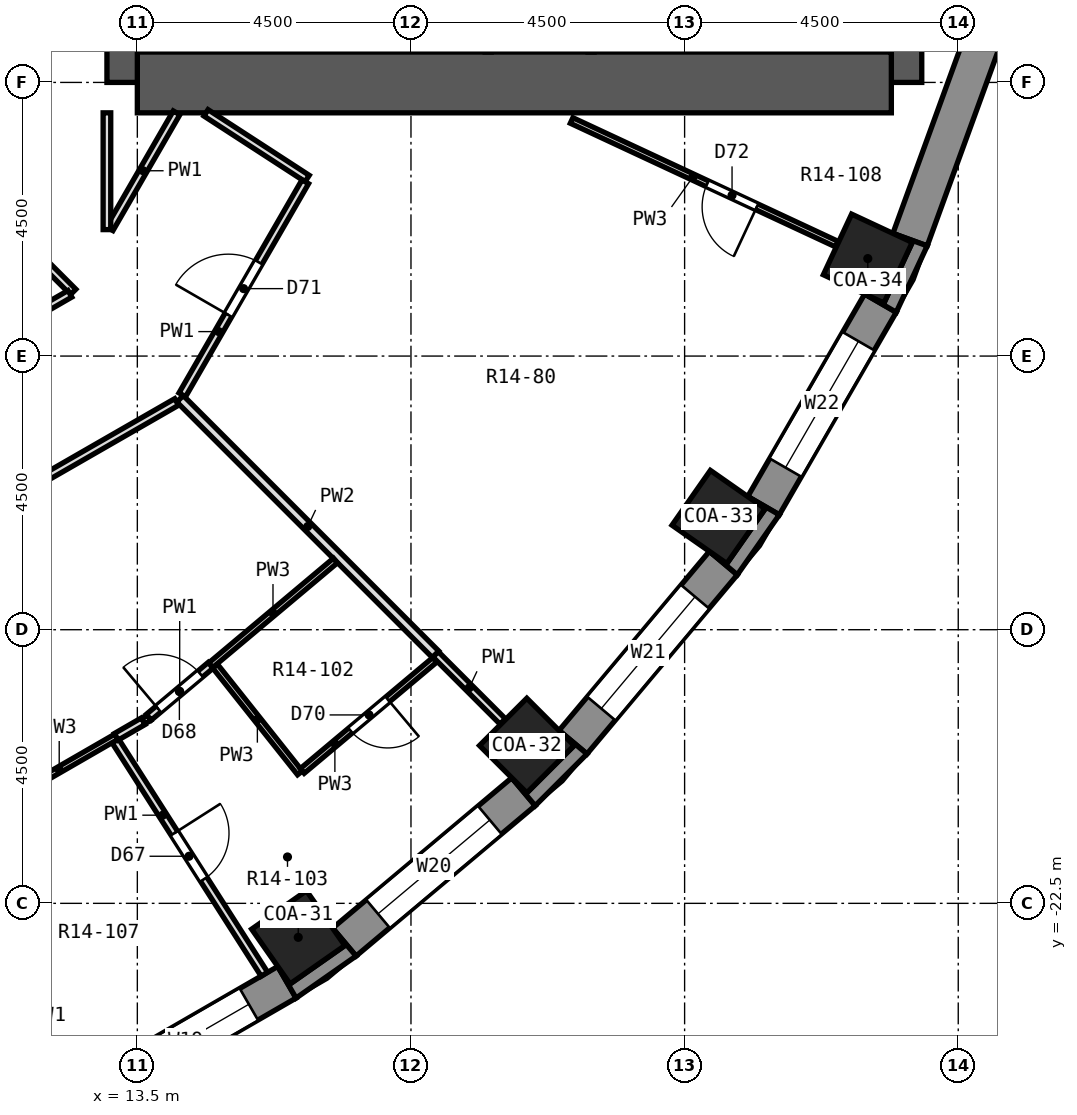
"""IFC4 building model, lengths in metres.
Left out: names, types, materials, properties, quantities, classifications, styles, units other than length and angle.
Written with IfcOpenShell. Run it as: python <this file> out.ifc"""

import sys

from ifc_helpers import new_model, si_unit, direction, frame, frame_2d, origin, origin_2d, place, context, subcontext, project, spatial, polyline, rectangle, outline, extrude, element, fill, save


model = new_model("IFC4")
c1 = context("Model", 3, precision=1e-05, world=origin(), true_north=direction((0.0, 1.0)))
c2 = subcontext(c1, "Body", "Model", "MODEL_VIEW")
j1 = project(units=[si_unit("LENGTHUNIT", "METRE"), si_unit("PLANEANGLEUNIT", "RADIAN")], contexts=[c1])
p1 = place(None, origin())
s1 = spatial("IfcSite", under=j1, at=p1, CompositionType="ELEMENT")
p2 = place(p1, origin())
s2 = spatial("IfcBuilding", under=s1, at=p2, CompositionType="ELEMENT")
p3 = place(p2, frame((0.0, 0.0, 75.8)))
s3 = spatial("IfcBuildingStorey", under=s2, at=p3, CompositionType="ELEMENT", Elevation=75.8)
for number, where, z_axis, x_axis in (
    (1, (16.146, -23.059, 0.0), (0.0, 0.0, 1.0), (0.574, -0.819, 0.0)),
    (2, (19.905, -19.905, 0.0), (0.0, 0.0, 1.0), (0.707, -0.707, 0.0)),
    (3, (23.059, -16.146, 0.0), (0.0, 0.0, 1.0), (0.819, -0.574, 0.0)),
    (4, (25.512, -11.897, 0.0), (0.0, 0.0, 1.0), (0.906, -0.423, 0.0)),
):
    element("IfcColumn", number, at=place(p3, frame(where, z_axis=z_axis, x_axis=x_axis)), inside=s3, PredefinedType="COLUMN", context=c2, shape_type="SweptSolid", body=[
        extrude(rectangle(XDim=1.1, YDim=1.1, at=origin_2d()), origin(), (0.0, 0.0, 1.0), 3.3),
    ])
p4 = place(p3, frame((13.5, -9.0, 0.0), z_axis=(0.0, 0.0, 1.0), x_axis=(0.0, 1.0, 0.0)))
e5 = element("IfcWall", 5, at=p4, inside=s3, PredefinedType="SHEAR", context=c2, shape_type="SweptSolid", body=[
    extrude(rectangle(XDim=18.0, YDim=1.0, at=frame_2d((9.0, 0.0))), origin(), (0.0, 0.0, 1.0), 3.3),
])
p5 = place(p4, frame((15.4, 0.0, 0.0)))
e6 = element("IfcOpeningElement", 6, at=p5, cuts=e5, PredefinedType="OPENING", context=c2, shape_type="SweptSolid", body=[
    extrude(rectangle(XDim=1.2, YDim=2.1, at=frame_2d((0.6, 1.05))), frame((0.0, 0.512, 0.0), z_axis=(0.0, -1.0, 0.0), x_axis=(1.0, 0.0, 0.0)), (0.0, 0.0, 1.0), 1.024),
])
p6 = place(p4, frame((1.4, 0.0, 0.0)))
e7 = element("IfcOpeningElement", 7, at=p6, cuts=e5, PredefinedType="OPENING", context=c2, shape_type="SweptSolid", body=[
    extrude(rectangle(XDim=1.2, YDim=2.1, at=frame_2d((0.6, 1.05))), frame((0.0, 0.512, 0.0), z_axis=(0.0, -1.0, 0.0), x_axis=(1.0, 0.0, 0.0)), (0.0, 0.0, 1.0), 1.024),
])
p7 = place(p4, frame((7.5, 0.0, 0.0)))
e8 = element("IfcOpeningElement", 8, at=p7, cuts=e5, PredefinedType="OPENING", context=c2, shape_type="SweptSolid", body=[
    extrude(rectangle(XDim=3.0, YDim=2.4, at=frame_2d((1.5, 1.2))), frame((0.0, 0.512, 0.0), z_axis=(0.0, -1.0, 0.0), x_axis=(1.0, 0.0, 0.0)), (0.0, 0.0, 1.0), 1.024),
])
p8 = place(p3, frame((25.9, -9.0, 0.0), z_axis=(0.0, 0.0, 1.0), x_axis=(0.0, 1.0, 0.0)))
e9 = element("IfcWall", 9, at=p8, inside=s3, PredefinedType="SHEAR", context=c2, shape_type="SweptSolid", body=[
    extrude(rectangle(XDim=18.0, YDim=1.0, at=frame_2d((9.0, 0.0))), origin(), (0.0, 0.0, 1.0), 3.3),
])
p9 = place(p3, frame((13.5, -9.0, 0.0), z_axis=(0.0, 0.0, 1.0), x_axis=(1.0, 0.0, 0.0)))
e10 = element("IfcWall", 10, at=p9, inside=s3, PredefinedType="SHEAR", context=c2, shape_type="SweptSolid", body=[
    extrude(rectangle(XDim=12.4, YDim=1.0, at=frame_2d((6.2, 0.0))), origin(), (0.0, 0.0, 1.0), 3.3),
])
p10 = place(p3, frame((12.63, -25.721, 0.0), z_axis=(0.0, 0.0, 1.0), x_axis=(0.86603124159, 0.499989888488, 0.0)))
e11 = element("IfcWall", 11, at=p10, inside=s3, PredefinedType="SOLIDWALL", context=c2, shape_type="SweptSolid", body=[
    extrude(rectangle(XDim=3.846, YDim=0.6, at=frame_2d((1.923, 0.0))), origin(), (0.0, 0.0, 1.0), 2.75),
])
p11 = place(p10, frame((0.723, 0.0, 0.9)))
e12 = element("IfcOpeningElement", 12, at=p11, cuts=e11, PredefinedType="OPENING", context=c2, shape_type="SweptSolid", body=[
    extrude(rectangle(XDim=2.4, YDim=1.8, at=frame_2d((1.2, 0.9))), frame((0.0, 0.312, 0.0), z_axis=(0.0, -1.0, 0.0), x_axis=(1.0, 0.0, 0.0)), (0.0, 0.0, 1.0), 0.624),
])
p12 = place(p3, frame((16.904, -23.137, 0.0), z_axis=(0.0, 0.0, 1.0), x_axis=(0.766026164483, 0.642809392687, 0.0)))
e13 = element("IfcWall", 13, at=p12, inside=s3, PredefinedType="SOLIDWALL", context=c2, shape_type="SweptSolid", body=[
    extrude(rectangle(XDim=3.846, YDim=0.6, at=frame_2d((1.923, 0.0))), origin(), (0.0, 0.0, 1.0), 2.75),
])
p13 = place(p12, frame((0.723, 0.0, 0.9)))
e14 = element("IfcOpeningElement", 14, at=p13, cuts=e13, PredefinedType="OPENING", context=c2, shape_type="SweptSolid", body=[
    extrude(rectangle(XDim=2.4, YDim=1.8, at=frame_2d((1.2, 0.9))), frame((0.0, 0.312, 0.0), z_axis=(0.0, -1.0, 0.0), x_axis=(1.0, 0.0, 0.0)), (0.0, 0.0, 1.0), 0.624),
])
p14 = place(p3, frame((20.665, -19.85, 0.0), z_axis=(0.0, 0.0, 1.0), x_axis=(0.642809392687, 0.766026164483, 0.0)))
e15 = element("IfcWall", 15, at=p14, inside=s3, PredefinedType="SOLIDWALL", context=c2, shape_type="SweptSolid", body=[
    extrude(rectangle(XDim=3.846, YDim=0.6, at=frame_2d((1.923, 0.0))), origin(), (0.0, 0.0, 1.0), 2.75),
])
p15 = place(p14, frame((0.723, 0.0, 0.9)))
e16 = element("IfcOpeningElement", 16, at=p15, cuts=e15, PredefinedType="OPENING", context=c2, shape_type="SweptSolid", body=[
    extrude(rectangle(XDim=2.4, YDim=1.8, at=frame_2d((1.2, 0.9))), frame((0.0, 0.312, 0.0), z_axis=(0.0, -1.0, 0.0), x_axis=(1.0, 0.0, 0.0)), (0.0, 0.0, 1.0), 0.624),
])
p16 = place(p3, frame((23.798, -15.96, 0.0), z_axis=(0.0, 0.0, 1.0), x_axis=(0.499989888488, 0.86603124159, 0.0)))
e17 = element("IfcWall", 17, at=p16, inside=s3, PredefinedType="SOLIDWALL", context=c2, shape_type="SweptSolid", body=[
    extrude(rectangle(XDim=3.846, YDim=0.6, at=frame_2d((1.923, 0.0))), origin(), (0.0, 0.0, 1.0), 2.75),
])
p17 = place(p16, frame((0.723, 0.0, 0.9)))
e18 = element("IfcOpeningElement", 18, at=p17, cuts=e17, PredefinedType="OPENING", context=c2, shape_type="SweptSolid", body=[
    extrude(rectangle(XDim=2.4, YDim=1.8, at=frame_2d((1.2, 0.9))), frame((0.0, 0.312, 0.0), z_axis=(0.0, -1.0, 0.0), x_axis=(1.0, 0.0, 0.0)), (0.0, 0.0, 1.0), 0.624),
])
p18 = place(p3, frame((26.208, -11.585, 0.0), z_axis=(0.0, 0.0, 1.0), x_axis=(0.342028474173, 0.939689588564, 0.0)))
e19 = element("IfcWall", 19, at=p18, inside=s3, PredefinedType="SOLIDWALL", context=c2, shape_type="SweptSolid", body=[
    extrude(rectangle(XDim=3.846, YDim=0.6, at=frame_2d((1.923, 0.0))), origin(), (0.0, 0.0, 1.0), 2.75),
])
p19 = place(p3, origin())
e20 = element("IfcWall", 20, at=p19, inside=s3, PredefinedType="SOLIDWALL", context=c2, shape_type="SweptSolid", body=[
    extrude(outline(polyline([(16.11, -24.058), (17.097, -23.367), (16.711, -22.907), (16.912, -23.194), (16.011, -23.825), (15.81, -23.538), (16.11, -24.058)])), origin(), (0.0, 0.0, 1.0), 2.75),
])
p20 = place(p3, origin())
e21 = element("IfcWall", 21, at=p20, inside=s3, PredefinedType="SOLIDWALL", context=c2, shape_type="SweptSolid", body=[
    extrude(outline(polyline([(20.895, -20.043), (20.435, -19.657), (20.683, -19.905), (19.905, -20.683), (19.657, -20.435), (20.043, -20.895), (20.895, -20.043)])), origin(), (0.0, 0.0, 1.0), 2.75),
])
p21 = place(p3, origin())
e22 = element("IfcWall", 22, at=p21, inside=s3, PredefinedType="SOLIDWALL", context=c2, shape_type="SweptSolid", body=[
    extrude(outline(polyline([(23.367, -17.097), (24.058, -16.11), (23.538, -15.81), (23.825, -16.011), (23.194, -16.912), (22.907, -16.711), (23.367, -17.097)])), origin(), (0.0, 0.0, 1.0), 2.75),
])
p22 = place(p3, origin())
e23 = element("IfcWall", 23, at=p22, inside=s3, PredefinedType="SOLIDWALL", context=c2, shape_type="SweptSolid", body=[
    extrude(outline(polyline([(26.49, -11.688), (25.926, -11.483), (26.243, -11.631), (25.779, -12.628), (25.461, -12.479), (25.981, -12.78), (26.49, -11.688)])), origin(), (0.0, 0.0, 1.0), 2.75),
])
p23 = place(p3, frame((13.138, -19.828, 0.0), z_axis=(0.0, 0.0, 1.0), x_axis=(0.538359660084, -0.842715181063, 0.0)))
e24 = element("IfcWall", 24, at=p23, inside=s3, PredefinedType="PARTITIONING", context=c2, shape_type="SweptSolid", body=[
    extrude(rectangle(XDim=4.553, YDim=0.125, at=frame_2d((2.276, 0.0))), origin(), (0.0, 0.0, 1.0), 2.75),
])
p24 = place(p23, frame((1.802, 0.0, 0.0)))
e25 = element("IfcOpeningElement", 25, at=p24, cuts=e24, PredefinedType="OPENING", context=c2, shape_type="SweptSolid", body=[
    extrude(rectangle(XDim=0.9, YDim=2.1, at=frame_2d((0.45, 1.05))), frame((0.0, 0.074, 0.0), z_axis=(0.0, -1.0, 0.0), x_axis=(1.0, 0.0, 0.0)), (0.0, 0.0, 1.0), 0.149),
])
p25 = place(p3, frame((14.774, -18.593, 0.0), z_axis=(0.0, 0.0, 1.0), x_axis=(0.622124779816, -0.782918104491, 0.0)))
e26 = element("IfcWall", 26, at=p25, inside=s3, PredefinedType="PARTITIONING", context=c2, shape_type="SweptSolid", body=[
    extrude(rectangle(XDim=2.25, YDim=0.1, at=frame_2d((1.125, 0.0))), origin(), (0.0, 0.0, 1.0), 2.75),
])
p26 = place(p3, frame((6.783, -6.783, 0.0), z_axis=(0.0, 0.0, 1.0), x_axis=(0.707106781187, -0.707106781187, 0.0)))
e27 = element("IfcWall", 27, at=p26, inside=s3, PredefinedType="PARTITIONING", context=c2, shape_type="SweptSolid", body=[
    extrude(rectangle(XDim=8.008, YDim=0.125, at=frame_2d((4.004, 0.0))), origin(), (0.0, 0.0, 1.0), 2.75),
])
p27 = place(p3, frame((18.404, -18.404, 0.0), z_axis=(0.0, 0.0, 1.0), x_axis=(0.707106781187, -0.707106781187, 0.0)))
e28 = element("IfcWall", 28, at=p27, inside=s3, PredefinedType="PARTITIONING", context=c2, shape_type="SweptSolid", body=[
    extrude(rectangle(XDim=1.563, YDim=0.125, at=frame_2d((0.781, 0.0))), origin(), (0.0, 0.0, 1.0), 2.75),
])
p28 = place(p3, frame((14.202, -14.202, 0.0), z_axis=(0.0, 0.0, 1.0), x_axis=(0.707106781187, -0.707106781187, 0.0)))
e29 = element("IfcWall", 29, at=p28, inside=s3, PredefinedType="PARTITIONING", context=c2, shape_type="SweptSolid", body=[
    extrude(rectangle(XDim=5.942, YDim=0.15, at=frame_2d((2.971, 0.0))), origin(), (0.0, 0.0, 1.0), 2.75),
])
p29 = place(p3, frame((14.629, -9.5, 0.0), z_axis=(0.0, 0.0, 1.0), x_axis=(0.838803325008, -0.544434552499, 0.0)))
e30 = element("IfcWall", 30, at=p29, inside=s3, PredefinedType="PARTITIONING", context=c2, shape_type="SweptSolid", body=[
    extrude(rectangle(XDim=1.984, YDim=0.125, at=frame_2d((0.992, 0.0))), origin(), (0.0, 0.0, 1.0), 2.75),
])
p30 = place(p3, frame((20.642, -9.626, 0.0), z_axis=(0.0, 0.0, 1.0), x_axis=(0.90635409516, -0.422518939442, 0.0)))
e31 = element("IfcWall", 31, at=p30, inside=s3, PredefinedType="PARTITIONING", context=c2, shape_type="SweptSolid", body=[
    extrude(rectangle(XDim=4.814, YDim=0.1, at=frame_2d((2.407, 0.0))), origin(), (0.0, 0.0, 1.0), 2.75),
])
p31 = place(p30, frame((2.461, 0.0, 0.0)))
e32 = element("IfcOpeningElement", 32, at=p31, cuts=e31, PredefinedType="OPENING", context=c2, shape_type="SweptSolid", body=[
    extrude(rectangle(XDim=0.9, YDim=2.1, at=frame_2d((0.45, 1.05))), frame((0.0, 0.062, 0.0), z_axis=(0.0, -1.0, 0.0), x_axis=(1.0, 0.0, 0.0)), (0.0, 0.0, 1.0), 0.124),
])
p32 = place(p3, frame((5.251, -19.367, 0.0), z_axis=(0.0, 0.0, 1.0), x_axis=(0.86701914354, 0.498274828519, 0.0)))
e33 = element("IfcWall", 33, at=p32, inside=s3, PredefinedType="PARTITIONING", context=c2, shape_type="SweptSolid", body=[
    extrude(rectangle(XDim=10.259, YDim=0.125, at=frame_2d((5.129, 0.0))), origin(), (0.0, 0.0, 1.0), 2.75),
])
p33 = place(p3, frame((10.093, -21.527, 0.0), z_axis=(0.0, 0.0, 1.0), x_axis=(0.866092412582, 0.499883919394, 0.0)))
e34 = element("IfcWall", 34, at=p33, inside=s3, PredefinedType="PARTITIONING", context=c2, shape_type="SweptSolid", body=[
    extrude(rectangle(XDim=3.534, YDim=0.1, at=frame_2d((1.767, 0.0))), origin(), (0.0, 0.0, 1.0), 2.75),
])
p34 = place(p33, frame((1.267, 0.0, 0.0)))
e35 = element("IfcOpeningElement", 35, at=p34, cuts=e34, PredefinedType="OPENING", context=c2, shape_type="SweptSolid", body=[
    extrude(rectangle(XDim=0.9, YDim=2.1, at=frame_2d((0.45, 1.05))), frame((0.0, 0.062, 0.0), z_axis=(0.0, -1.0, 0.0), x_axis=(1.0, 0.0, 0.0)), (0.0, 0.0, 1.0), 0.124),
])
p35 = place(p3, frame((13.597, -19.505, 0.0), z_axis=(0.0, 0.0, 1.0), x_axis=(0.86665063443, 0.498915501706, 0.0)))
e36 = element("IfcWall", 36, at=p35, inside=s3, PredefinedType="PARTITIONING", context=c2, shape_type="SweptSolid", body=[
    extrude(rectangle(XDim=0.114, YDim=0.1, at=frame_2d((0.057, 0.0))), origin(), (0.0, 0.0, 1.0), 2.75),
])
p36 = place(p3, frame((13.154, -19.761, 0.0), z_axis=(0.0, 0.0, 1.0), x_axis=(0.865644253932, 0.500659590574, 0.0)))
e37 = element("IfcWall", 37, at=p36, inside=s3, PredefinedType="PARTITIONING", context=c2, shape_type="SweptSolid", body=[
    extrude(rectangle(XDim=0.511, YDim=0.125, at=frame_2d((0.255, 0.0))), origin(), (0.0, 0.0, 1.0), 2.75),
])
p37 = place(p3, frame((4.609, -16.969, 0.0), z_axis=(0.0, 0.0, 1.0), x_axis=(0.866042609802, 0.499970197119, 0.0)))
e38 = element("IfcWall", 38, at=p37, inside=s3, PredefinedType="PARTITIONING", context=c2, shape_type="SweptSolid", body=[
    extrude(rectangle(XDim=8.985, YDim=0.125, at=frame_2d((4.493, 0.0))), origin(), (0.0, 0.0, 1.0), 2.75),
])
p38 = place(p37, frame((3.993, 0.0, 0.0)))
e39 = element("IfcOpeningElement", 39, at=p38, cuts=e38, PredefinedType="OPENING", context=c2, shape_type="SweptSolid", body=[
    extrude(rectangle(XDim=1.0, YDim=2.1, at=frame_2d((0.5, 1.05))), frame((0.0, 0.074, 0.0), z_axis=(0.0, -1.0, 0.0), x_axis=(1.0, 0.0, 0.0)), (0.0, 0.0, 1.0), 0.149),
])
p39 = place(p3, frame((16.212, -20.323, 0.0), z_axis=(0.0, 0.0, 1.0), x_axis=(0.766232462385, 0.642563470474, 0.0)))
e40 = element("IfcWall", 40, at=p39, inside=s3, PredefinedType="PARTITIONING", context=c2, shape_type="SweptSolid", body=[
    extrude(rectangle(XDim=2.843, YDim=0.1, at=frame_2d((1.421, 0.0))), origin(), (0.0, 0.0, 1.0), 2.75),
])
p40 = place(p39, frame((1.034, 0.0, 0.0)))
e41 = element("IfcOpeningElement", 41, at=p40, cuts=e40, PredefinedType="OPENING", context=c2, shape_type="SweptSolid", body=[
    extrude(rectangle(XDim=0.8, YDim=2.1, at=frame_2d((0.4, 1.05))), frame((0.0, 0.062, 0.0), z_axis=(0.0, -1.0, 0.0), x_axis=(1.0, 0.0, 0.0)), (0.0, 0.0, 1.0), 0.124),
])
p41 = place(p3, frame((14.704, -18.586, 0.0), z_axis=(0.0, 0.0, 1.0), x_axis=(0.765999084346, 0.642841662294, 0.0)))
e42 = element("IfcWall", 42, at=p41, inside=s3, PredefinedType="PARTITIONING", context=c2, shape_type="SweptSolid", body=[
    extrude(rectangle(XDim=2.68, YDim=0.1, at=frame_2d((1.34, 0.0))), origin(), (0.0, 0.0, 1.0), 2.75),
])
p42 = place(p3, frame((13.688, -19.44, 0.0), z_axis=(0.0, 0.0, 1.0), x_axis=(0.765864266058, 0.643002275249, 0.0)))
e43 = element("IfcWall", 43, at=p42, inside=s3, PredefinedType="PARTITIONING", context=c2, shape_type="SweptSolid", body=[
    extrude(rectangle(XDim=1.327, YDim=0.125, at=frame_2d((0.664, 0.0))), origin(), (0.0, 0.0, 1.0), 2.75),
])
p43 = place(p42, frame((0.208, 0.0, 0.0)))
e44 = element("IfcOpeningElement", 44, at=p43, cuts=e43, PredefinedType="OPENING", context=c2, shape_type="SweptSolid", body=[
    extrude(rectangle(XDim=0.9, YDim=2.1, at=frame_2d((0.45, 1.05))), frame((0.0, 0.074, 0.0), z_axis=(0.0, -1.0, 0.0), x_axis=(1.0, 0.0, 0.0)), (0.0, 0.0, 1.0), 0.149),
])
p44 = place(p3, frame((14.24, -14.137, 0.0), z_axis=(0.0, 0.0, 1.0), x_axis=(0.499962802816, 0.866046878523, 0.0)))
e45 = element("IfcWall", 45, at=p44, inside=s3, PredefinedType="PARTITIONING", context=c2, shape_type="SweptSolid", body=[
    extrude(rectangle(XDim=4.045, YDim=0.125, at=frame_2d((2.022, 0.0))), origin(), (0.0, 0.0, 1.0), 2.75),
])
p45 = place(p44, frame((1.516, 0.0, 0.0)))
e46 = element("IfcOpeningElement", 46, at=p45, cuts=e45, PredefinedType="OPENING", context=c2, shape_type="SweptSolid", body=[
    extrude(rectangle(XDim=1.0, YDim=2.1, at=frame_2d((0.5, 1.05))), frame((0.0, 0.074, 0.0), z_axis=(0.0, -1.0, 0.0), x_axis=(1.0, 0.0, 0.0)), (0.0, 0.0, 1.0), 0.149),
])
p46 = place(p3, frame((13.045, -11.405, 0.0), z_axis=(0.0, 0.0, 1.0), x_axis=(0.500077893725, 0.86598042715, 0.0)))
e47 = element("IfcWall", 47, at=p46, inside=s3, PredefinedType="PARTITIONING", context=c2, shape_type="SweptSolid", body=[
    extrude(rectangle(XDim=2.2, YDim=0.125, at=frame_2d((1.1, 0.0))), origin(), (0.0, 0.0, 1.0), 2.75),
])
p47 = place(p3, frame((13.0, -11.42, 0.0), z_axis=(0.0, 0.0, 1.0), x_axis=(0.0, 1.0, 0.0)))
e48 = element("IfcWall", 48, at=p47, inside=s3, PredefinedType="PARTITIONING", context=c2, shape_type="SweptSolid", body=[
    extrude(rectangle(XDim=1.92, YDim=0.125, at=frame_2d((0.96, 0.0))), origin(), (0.0, 0.0, 1.0), 2.75),
])
p48 = place(p11, origin())
e49 = element("IfcWindow", 49, at=p48, inside=s3, PartitioningType="SINGLE_PANEL", PredefinedType="WINDOW", context=c2, shape_type="SweptSolid", body=[
    extrude(rectangle(XDim=2.4, YDim=1.8, at=frame_2d((1.2, 0.9))), frame((0.0, 0.18, 0.0), z_axis=(0.0, -1.0, 0.0), x_axis=(1.0, 0.0, 0.0)), (0.0, 0.0, 1.0), 0.06),
])
fill(e12, e49)
p49 = place(p13, origin())
e50 = element("IfcWindow", 50, at=p49, inside=s3, PartitioningType="SINGLE_PANEL", PredefinedType="WINDOW", context=c2, shape_type="SweptSolid", body=[
    extrude(rectangle(XDim=2.4, YDim=1.8, at=frame_2d((1.2, 0.9))), frame((0.0, 0.18, 0.0), z_axis=(0.0, -1.0, 0.0), x_axis=(1.0, 0.0, 0.0)), (0.0, 0.0, 1.0), 0.06),
])
fill(e14, e50)
p50 = place(p15, origin())
e51 = element("IfcWindow", 51, at=p50, inside=s3, PartitioningType="SINGLE_PANEL", PredefinedType="WINDOW", context=c2, shape_type="SweptSolid", body=[
    extrude(rectangle(XDim=2.4, YDim=1.8, at=frame_2d((1.2, 0.9))), frame((0.0, 0.18, 0.0), z_axis=(0.0, -1.0, 0.0), x_axis=(1.0, 0.0, 0.0)), (0.0, 0.0, 1.0), 0.06),
])
fill(e16, e51)
p51 = place(p17, origin())
e52 = element("IfcWindow", 52, at=p51, inside=s3, PartitioningType="SINGLE_PANEL", PredefinedType="WINDOW", context=c2, shape_type="SweptSolid", body=[
    extrude(rectangle(XDim=2.4, YDim=1.8, at=frame_2d((1.2, 0.9))), frame((0.0, 0.18, 0.0), z_axis=(0.0, -1.0, 0.0), x_axis=(1.0, 0.0, 0.0)), (0.0, 0.0, 1.0), 0.06),
])
fill(e18, e52)
p52 = place(p24, origin())
e53 = element("IfcDoor", 53, at=p52, inside=s3, OperationType="SINGLE_SWING_LEFT", PredefinedType="DOOR", context=c2, shape_type="SweptSolid", body=[
    extrude(rectangle(XDim=0.9, YDim=2.1, at=frame_2d((0.45, 1.05))), frame((0.0, 0.025, 0.0), z_axis=(0.0, -1.0, 0.0), x_axis=(1.0, 0.0, 0.0)), (0.0, 0.0, 1.0), 0.05),
])
fill(e25, e53)
p53 = place(p43, origin())
e54 = element("IfcDoor", 54, at=p53, inside=s3, OperationType="SINGLE_SWING_LEFT", PredefinedType="DOOR", context=c2, shape_type="SweptSolid", body=[
    extrude(rectangle(XDim=0.9, YDim=2.1, at=frame_2d((0.45, 1.05))), frame((0.0, 0.025, 0.0), z_axis=(0.0, -1.0, 0.0), x_axis=(1.0, 0.0, 0.0)), (0.0, 0.0, 1.0), 0.05),
])
fill(e44, e54)
p54 = place(p40, frame((0.8, 0.0, 0.0), z_axis=(0.0, 0.0, 1.0), x_axis=(-1.0, 0.0, 0.0)))
e55 = element("IfcDoor", 55, at=p54, inside=s3, OperationType="SINGLE_SWING_LEFT", PredefinedType="DOOR", context=c2, shape_type="SweptSolid", body=[
    extrude(rectangle(XDim=0.8, YDim=2.1, at=frame_2d((0.4, 1.05))), frame((0.0, 0.025, 0.0), z_axis=(0.0, -1.0, 0.0), x_axis=(1.0, 0.0, 0.0)), (0.0, 0.0, 1.0), 0.05),
])
fill(e41, e55)
p55 = place(p45, origin())
e56 = element("IfcDoor", 56, at=p55, inside=s3, OperationType="SINGLE_SWING_LEFT", PredefinedType="DOOR", context=c2, shape_type="SweptSolid", body=[
    extrude(rectangle(XDim=1.0, YDim=2.1, at=frame_2d((0.5, 1.05))), frame((0.0, 0.025, 0.0), z_axis=(0.0, -1.0, 0.0), x_axis=(1.0, 0.0, 0.0)), (0.0, 0.0, 1.0), 0.05),
])
fill(e46, e56)
p56 = place(p31, frame((0.9, 0.0, 0.0), z_axis=(0.0, 0.0, 1.0), x_axis=(-1.0, 0.0, 0.0)))
e57 = element("IfcDoor", 57, at=p56, inside=s3, OperationType="SINGLE_SWING_LEFT", PredefinedType="DOOR", context=c2, shape_type="SweptSolid", body=[
    extrude(rectangle(XDim=0.9, YDim=2.1, at=frame_2d((0.45, 1.05))), frame((0.0, 0.025, 0.0), z_axis=(0.0, -1.0, 0.0), x_axis=(1.0, 0.0, 0.0)), (0.0, 0.0, 1.0), 0.05),
])
fill(e32, e57)
save(model, sys.argv[1])
